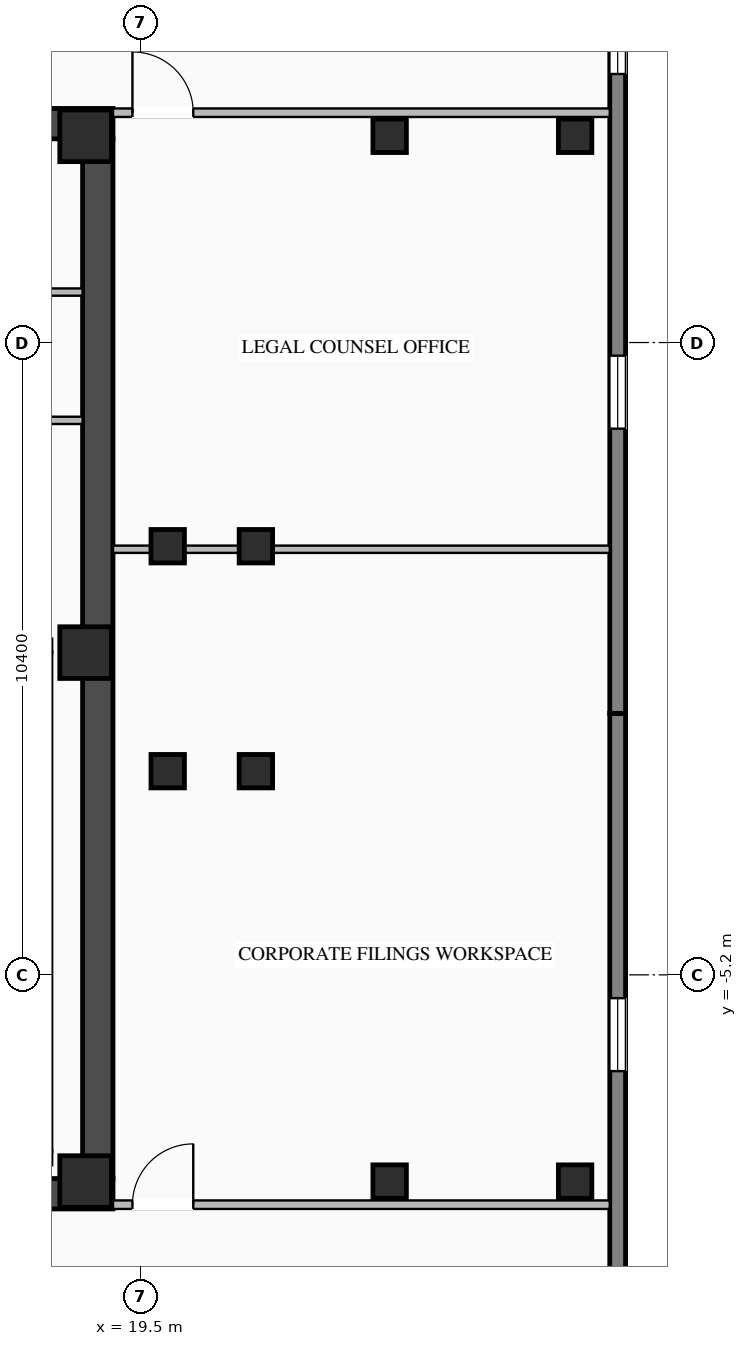
"""IFC4 building model, lengths in metres.
Left out: names, types, materials, properties, quantities, classifications, styles, units other than length and angle.
Written with IfcOpenShell. Run it as: python <this file> out.ifc"""

import sys

from ifc_helpers import new_model, si_unit, direction, frame, frame_2d, origin, origin_2d, place, context, subcontext, project, spatial, rectangle, i_section, extrude, element, fill, save


model = new_model("IFC4")
c1 = context("Model", 3, precision=1e-05, world=origin(), true_north=direction((0.0, 1.0)))
c2 = subcontext(c1, "Body", "Model", "MODEL_VIEW")
j1 = project(units=[si_unit("LENGTHUNIT", "METRE"), si_unit("PLANEANGLEUNIT", "RADIAN")], contexts=[c1])
p1 = place(None, origin())
s1 = spatial("IfcSite", under=j1, at=p1, CompositionType="ELEMENT")
p2 = place(p1, origin())
s2 = spatial("IfcBuilding", under=s1, at=p2, CompositionType="ELEMENT")
p3 = place(p2, frame((0.0, 0.0, 229.2)))
s3 = spatial("IfcBuildingStorey", under=s2, at=p3, CompositionType="ELEMENT", Elevation=229.2)
p4 = place(p3, frame((8.8, -8.8, 0.0), z_axis=(0.0, 0.0, 1.0), x_axis=(1.0, 0.0, 0.0)))
e1 = element("IfcWall", 1, at=p4, inside=s3, PredefinedType="SHEAR", context=c2, shape_type="SweptSolid", body=[
    extrude(rectangle(XDim=10.25, YDim=0.5, at=frame_2d((5.125, 0.0))), origin(), (0.0, 0.0, 1.0), 3.27),
])
p5 = place(p3, frame((8.8, 8.8, 0.0), z_axis=(0.0, 0.0, 1.0), x_axis=(1.0, 0.0, 0.0)))
e2 = element("IfcWall", 2, at=p5, inside=s3, PredefinedType="SHEAR", context=c2, shape_type="SweptSolid", body=[
    extrude(rectangle(XDim=10.25, YDim=0.5, at=frame_2d((5.125, 0.0))), origin(), (0.0, 0.0, 1.0), 3.27),
])
p6 = place(p5, frame((3.25, 0.0, 0.0)))
e3 = element("IfcOpeningElement", 3, at=p6, cuts=e2, PredefinedType="OPENING", context=c2, shape_type="SweptSolid", body=[
    extrude(rectangle(XDim=1.4, YDim=2.05, at=frame_2d((0.7, 1.025))), frame((0.0, 0.26, 0.0), z_axis=(0.0, -1.0, 0.0), x_axis=(1.0, 0.0, 0.0)), (0.0, 0.0, 1.0), 0.52),
])
p7 = place(p3, frame((18.8, -8.55, 0.0), z_axis=(0.0, 0.0, 1.0), x_axis=(0.0, 1.0, 0.0)))
e4 = element("IfcWall", 4, at=p7, inside=s3, PredefinedType="SHEAR", context=c2, shape_type="SweptSolid", body=[
    extrude(rectangle(XDim=17.1, YDim=0.5, at=frame_2d((8.55, 0.0))), origin(), (0.0, 0.0, 1.0), 3.27),
])
for number, where, z_axis, x_axis in (
    (5, (18.6, -8.6, 0.0), (0.0, 0.0, 1.0), (1.0, 0.0, 0.0)),
    (6, (18.6, 0.1, 0.0), (0.0, 0.0, 1.0), (1.0, 0.0, 0.0)),
    (7, (18.6, 8.6, 0.0), (0.0, 0.0, 1.0), (1.0, 0.0, 0.0)),
):
    element("IfcColumn", number, at=place(p3, frame(where, z_axis=z_axis, x_axis=x_axis)), inside=s3, PredefinedType="COLUMN", context=c2, shape_type="SweptSolid", body=[
        extrude(rectangle(XDim=0.85, YDim=0.85, at=origin_2d()), origin(), (0.0, 0.0, 1.0), 3.45),
    ])
for number, where, z_axis, x_axis in (
    (8, (19.95, -1.85, 0.0), (0.0, 0.0, 1.0), (1.0, 0.0, 0.0)),
    (9, (19.95, 1.85, 0.0), (0.0, 0.0, 1.0), (1.0, 0.0, 0.0)),
    (10, (21.4, -1.85, 0.0), (0.0, 0.0, 1.0), (1.0, 0.0, 0.0)),
    (11, (21.4, 1.85, 0.0), (0.0, 0.0, 1.0), (1.0, 0.0, 0.0)),
    (12, (23.6, -8.6, 0.0), (0.0, 0.0, 1.0), (1.0, 0.0, 0.0)),
    (13, (23.6, 8.6, 0.0), (0.0, 0.0, 1.0), (1.0, 0.0, 0.0)),
    (14, (26.65, -8.6, 0.0), (0.0, 0.0, 1.0), (1.0, 0.0, 0.0)),
    (15, (26.65, 8.6, 0.0), (0.0, 0.0, 1.0), (1.0, 0.0, 0.0)),
):
    element("IfcColumn", number, at=place(p3, frame(where, z_axis=z_axis, x_axis=x_axis)), inside=s3, PredefinedType="COLUMN", context=c2, shape_type="SweptSolid", body=[
        extrude(i_section(OverallWidth=0.55, OverallDepth=0.55, WebThickness=0.024, FlangeThickness=0.036, at=origin_2d()), origin(), (0.0, 0.0, 1.0), 3.45),
    ])
p8 = place(p3, frame((27.35, -0.9, 0.0), z_axis=(0.0, 0.0, 1.0), x_axis=(0.0, -1.0, 0.0)))
e16 = element("IfcWall", 16, at=p8, inside=s3, PredefinedType="STANDARD", context=c2, shape_type="SweptSolid", body=[
    extrude(rectangle(XDim=15.85, YDim=0.26, at=frame_2d((7.925, 0.0))), origin(), (0.0, 0.0, 1.0), 3.25),
])
p9 = place(p8, frame((4.683, 0.0, 0.76)))
e17 = element("IfcOpeningElement", 17, at=p9, cuts=e16, PredefinedType="OPENING", context=c2, shape_type="SweptSolid", body=[
    extrude(rectangle(XDim=1.2, YDim=1.95, at=frame_2d((0.6, 0.975))), frame((0.0, 0.14, 0.0), z_axis=(0.0, -1.0, 0.0), x_axis=(1.0, 0.0, 0.0)), (0.0, 0.0, 1.0), 0.28),
])
p10 = place(p8, frame((10.517, 0.0, 0.76)))
e18 = element("IfcOpeningElement", 18, at=p10, cuts=e16, PredefinedType="OPENING", context=c2, shape_type="SweptSolid", body=[
    extrude(rectangle(XDim=1.2, YDim=1.95, at=frame_2d((0.6, 0.975))), frame((0.0, 0.14, 0.0), z_axis=(0.0, -1.0, 0.0), x_axis=(1.0, 0.0, 0.0)), (0.0, 0.0, 1.0), 0.28),
])
p11 = place(p3, frame((27.35, 14.95, 0.0), z_axis=(0.0, 0.0, 1.0), x_axis=(0.0, -1.0, 0.0)))
e19 = element("IfcWall", 19, at=p11, inside=s3, PredefinedType="STANDARD", context=c2, shape_type="SweptSolid", body=[
    extrude(rectangle(XDim=15.85, YDim=0.26, at=frame_2d((7.925, 0.0))), origin(), (0.0, 0.0, 1.0), 3.25),
])
p12 = place(p11, frame((4.133, 0.0, 0.76)))
e20 = element("IfcOpeningElement", 20, at=p12, cuts=e19, PredefinedType="OPENING", context=c2, shape_type="SweptSolid", body=[
    extrude(rectangle(XDim=1.2, YDim=1.95, at=frame_2d((0.6, 0.975))), frame((0.0, 0.14, 0.0), z_axis=(0.0, -1.0, 0.0), x_axis=(1.0, 0.0, 0.0)), (0.0, 0.0, 1.0), 0.28),
])
p13 = place(p11, frame((9.967, 0.0, 0.76)))
e21 = element("IfcOpeningElement", 21, at=p13, cuts=e19, PredefinedType="OPENING", context=c2, shape_type="SweptSolid", body=[
    extrude(rectangle(XDim=1.2, YDim=1.95, at=frame_2d((0.6, 0.975))), frame((0.0, 0.14, 0.0), z_axis=(0.0, -1.0, 0.0), x_axis=(1.0, 0.0, 0.0)), (0.0, 0.0, 1.0), 0.28),
])
p14 = place(p3, frame((13.9, 3.92, 0.0), z_axis=(0.0, 0.0, 1.0), x_axis=(1.0, 0.0, 0.0)))
e22 = element("IfcWall", 22, at=p14, inside=s3, PredefinedType="STANDARD", context=c2, shape_type="SweptSolid", body=[
    extrude(rectangle(XDim=4.65, YDim=0.12, at=frame_2d((2.325, 0.0))), origin(), (0.0, 0.0, 1.0), 3.25),
])
p15 = place(p3, frame((16.15, 6.03, 0.0), z_axis=(0.0, 0.0, 1.0), x_axis=(1.0, 0.0, 0.0)))
e23 = element("IfcWall", 23, at=p15, inside=s3, PredefinedType="STANDARD", context=c2, shape_type="SweptSolid", body=[
    extrude(rectangle(XDim=2.4, YDim=0.12, at=frame_2d((1.2, 0.0))), origin(), (0.0, 0.0, 1.0), 3.25),
])
p16 = place(p3, frame((19.05, 8.98, 0.0), z_axis=(0.0, 0.0, 1.0), x_axis=(1.0, 0.0, 0.0)))
e24 = element("IfcWall", 24, at=p16, inside=s3, PredefinedType="STANDARD", context=c2, shape_type="SweptSolid", body=[
    extrude(rectangle(XDim=8.17, YDim=0.14, at=frame_2d((4.085, 0.0))), origin(), (0.0, 0.0, 1.0), 3.25),
])
p17 = place(p16, frame((0.32, 0.0, 0.0)))
e25 = element("IfcOpeningElement", 25, at=p17, cuts=e24, PredefinedType="OPENING", context=c2, shape_type="SweptSolid", body=[
    extrude(rectangle(XDim=1.0, YDim=2.08, at=frame_2d((0.5, 1.04))), frame((0.0, 0.08, 0.0), z_axis=(0.0, -1.0, 0.0), x_axis=(1.0, 0.0, 0.0)), (0.0, 0.0, 1.0), 0.16),
])
p18 = place(p3, frame((19.05, -8.98, 0.0), z_axis=(0.0, 0.0, 1.0), x_axis=(1.0, 0.0, 0.0)))
e26 = element("IfcWall", 26, at=p18, inside=s3, PredefinedType="STANDARD", context=c2, shape_type="SweptSolid", body=[
    extrude(rectangle(XDim=8.17, YDim=0.14, at=frame_2d((4.085, 0.0))), origin(), (0.0, 0.0, 1.0), 3.25),
])
p19 = place(p18, frame((0.32, 0.0, 0.0)))
e27 = element("IfcOpeningElement", 27, at=p19, cuts=e26, PredefinedType="OPENING", context=c2, shape_type="SweptSolid", body=[
    extrude(rectangle(XDim=1.0, YDim=2.08, at=frame_2d((0.5, 1.04))), frame((0.0, 0.08, 0.0), z_axis=(0.0, -1.0, 0.0), x_axis=(1.0, 0.0, 0.0)), (0.0, 0.0, 1.0), 0.16),
])
p20 = place(p3, frame((19.05, 1.8, 0.0), z_axis=(0.0, 0.0, 1.0), x_axis=(1.0, 0.0, 0.0)))
e28 = element("IfcWall", 28, at=p20, inside=s3, PredefinedType="STANDARD", context=c2, shape_type="SweptSolid", body=[
    extrude(rectangle(XDim=8.17, YDim=0.12, at=frame_2d((4.085, 0.0))), origin(), (0.0, 0.0, 1.0), 3.25),
])
p21 = place(p9, origin())
e29 = element("IfcWindow", 29, at=p21, inside=s3, PartitioningType="SINGLE_PANEL", PredefinedType="WINDOW", context=c2, shape_type="SweptSolid", body=[
    extrude(rectangle(XDim=1.2, YDim=1.95, at=frame_2d((0.6, 0.975))), frame((0.0, 0.03, 0.0), z_axis=(0.0, -1.0, 0.0), x_axis=(1.0, 0.0, 0.0)), (0.0, 0.0, 1.0), 0.06),
])
fill(e17, e29)
p22 = place(p12, origin())
e30 = element("IfcWindow", 30, at=p22, inside=s3, PartitioningType="SINGLE_PANEL", PredefinedType="WINDOW", context=c2, shape_type="SweptSolid", body=[
    extrude(rectangle(XDim=1.2, YDim=1.95, at=frame_2d((0.6, 0.975))), frame((0.0, 0.03, 0.0), z_axis=(0.0, -1.0, 0.0), x_axis=(1.0, 0.0, 0.0)), (0.0, 0.0, 1.0), 0.06),
])
fill(e20, e30)
p23 = place(p13, origin())
e31 = element("IfcWindow", 31, at=p23, inside=s3, PartitioningType="SINGLE_PANEL", PredefinedType="WINDOW", context=c2, shape_type="SweptSolid", body=[
    extrude(rectangle(XDim=1.2, YDim=1.95, at=frame_2d((0.6, 0.975))), frame((0.0, 0.03, 0.0), z_axis=(0.0, -1.0, 0.0), x_axis=(1.0, 0.0, 0.0)), (0.0, 0.0, 1.0), 0.06),
])
fill(e21, e31)
p24 = place(p17, origin())
e32 = element("IfcDoor", 32, at=p24, inside=s3, OperationType="SINGLE_SWING_LEFT", PredefinedType="DOOR", context=c2, shape_type="SweptSolid", body=[
    extrude(rectangle(XDim=1.0, YDim=2.08, at=frame_2d((0.5, 1.04))), frame((0.0, 0.025, 0.0), z_axis=(0.0, -1.0, 0.0), x_axis=(1.0, 0.0, 0.0)), (0.0, 0.0, 1.0), 0.05),
])
fill(e25, e32)
p25 = place(p19, origin())
e33 = element("IfcDoor", 33, at=p25, inside=s3, OperationType="SINGLE_SWING_RIGHT", PredefinedType="DOOR", context=c2, shape_type="SweptSolid", body=[
    extrude(rectangle(XDim=1.0, YDim=2.08, at=frame_2d((0.5, 1.04))), frame((0.0, 0.025, 0.0), z_axis=(0.0, -1.0, 0.0), x_axis=(1.0, 0.0, 0.0)), (0.0, 0.0, 1.0), 0.05),
])
fill(e27, e33)
save(model, sys.argv[1])
